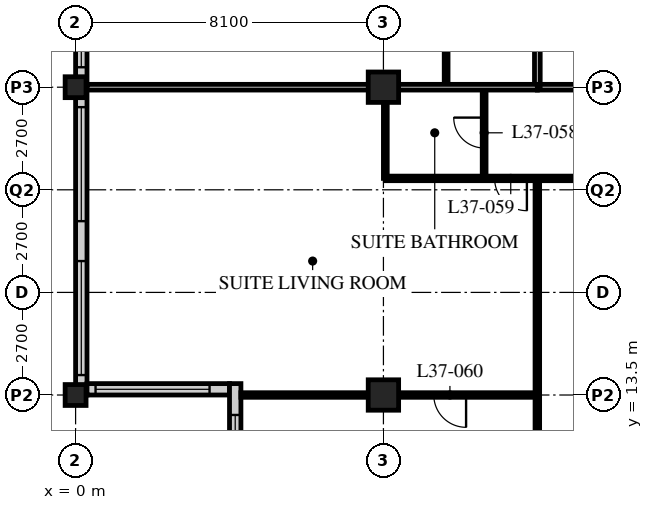
"""IFC4 building model, lengths in metres.
Left out: names, types, materials, properties, quantities, classifications, styles, units other than length and angle.
Written with IfcOpenShell. Run it as: python <this file> out.ifc"""

import sys

from ifc_helpers import new_model, si_unit, direction, frame, frame_2d, origin, origin_2d, place, context, subcontext, project, spatial, rectangle, hollow_rectangle, extrude, element, fill, save


model = new_model("IFC4")
c1 = context("Model", 3, precision=1e-05, world=origin(), true_north=direction((0.0, 1.0)))
c2 = subcontext(c1, "Body", "Model", "MODEL_VIEW")
j1 = project(units=[si_unit("LENGTHUNIT", "METRE"), si_unit("PLANEANGLEUNIT", "RADIAN")], contexts=[c1])
p1 = place(None, origin())
s1 = spatial("IfcSite", under=j1, at=p1, CompositionType="ELEMENT")
p2 = place(p1, origin())
s2 = spatial("IfcBuilding", under=s1, at=p2, CompositionType="ELEMENT")
p3 = place(p2, frame((0.0, 0.0, 144.2)))
s3 = spatial("IfcBuildingStorey", under=s2, at=p3, CompositionType="ELEMENT", Elevation=144.2)
for number, where, z_axis, x_axis in (
    (1, (0.0, 13.5, 0.0), (0.0, 0.0, 1.0), (1.0, 0.0, 0.0)),
    (2, (0.0, 21.6, 0.0), (0.0, 0.0, 1.0), (1.0, 0.0, 0.0)),
):
    element("IfcColumn", number, at=place(p3, frame(where, z_axis=z_axis, x_axis=x_axis)), inside=s3, PredefinedType="COLUMN", context=c2, shape_type="SweptSolid", body=[
        extrude(hollow_rectangle(XDim=0.55, YDim=0.55, WallThickness=0.04, at=origin_2d()), origin(), (0.0, 0.0, 1.0), 3.4),
    ])
for number, where, z_axis, x_axis in (
    (3, (8.1, 13.5, 0.0), (0.0, 0.0, 1.0), (1.0, 0.0, 0.0)),
    (4, (8.1, 21.6, 0.0), (0.0, 0.0, 1.0), (1.0, 0.0, 0.0)),
):
    element("IfcColumn", number, at=place(p3, frame(where, z_axis=z_axis, x_axis=x_axis)), inside=s3, PredefinedType="COLUMN", context=c2, shape_type="SweptSolid", body=[
        extrude(hollow_rectangle(XDim=0.8, YDim=0.8, WallThickness=0.08, at=origin_2d()), origin(), (0.0, 0.0, 1.0), 3.4),
    ])
p4 = place(p3, frame((0.15, 45.6, 0.0), z_axis=(0.0, 0.0, 1.0), x_axis=(0.0, -1.0, 0.0)))
e5 = element("IfcWall", 5, at=p4, inside=s3, PredefinedType="SOLIDWALL", context=c2, shape_type="SweptSolid", body=[
    extrude(rectangle(XDim=32.1, YDim=0.3, at=frame_2d((16.05, 0.0))), origin(), (0.0, 0.0, 1.0), 3.19),
])
p5 = place(p4, frame((0.225, 0.0, 0.9)))
e6 = element("IfcOpeningElement", 6, at=p5, cuts=e5, PredefinedType="OPENING", context=c2, shape_type="SweptSolid", body=[
    extrude(rectangle(XDim=3.0, YDim=1.4, at=frame_2d((1.5, 0.7))), frame((0.0, 0.16, 0.0), z_axis=(0.0, -1.0, 0.0), x_axis=(1.0, 0.0, 0.0)), (0.0, 0.0, 1.0), 0.32),
])
p6 = place(p4, frame((4.275, 0.0, 0.9)))
e7 = element("IfcOpeningElement", 7, at=p6, cuts=e5, PredefinedType="OPENING", context=c2, shape_type="SweptSolid", body=[
    extrude(rectangle(XDim=3.0, YDim=1.4, at=frame_2d((1.5, 0.7))), frame((0.0, 0.16, 0.0), z_axis=(0.0, -1.0, 0.0), x_axis=(1.0, 0.0, 0.0)), (0.0, 0.0, 1.0), 0.32),
])
p7 = place(p4, frame((8.325, 0.0, 0.9)))
e8 = element("IfcOpeningElement", 8, at=p7, cuts=e5, PredefinedType="OPENING", context=c2, shape_type="SweptSolid", body=[
    extrude(rectangle(XDim=3.0, YDim=1.4, at=frame_2d((1.5, 0.7))), frame((0.0, 0.16, 0.0), z_axis=(0.0, -1.0, 0.0), x_axis=(1.0, 0.0, 0.0)), (0.0, 0.0, 1.0), 0.32),
])
p8 = place(p4, frame((12.375, 0.0, 0.9)))
e9 = element("IfcOpeningElement", 9, at=p8, cuts=e5, PredefinedType="OPENING", context=c2, shape_type="SweptSolid", body=[
    extrude(rectangle(XDim=3.0, YDim=1.4, at=frame_2d((1.5, 0.7))), frame((0.0, 0.16, 0.0), z_axis=(0.0, -1.0, 0.0), x_axis=(1.0, 0.0, 0.0)), (0.0, 0.0, 1.0), 0.32),
])
p9 = place(p4, frame((16.425, 0.0, 0.9)))
e10 = element("IfcOpeningElement", 10, at=p9, cuts=e5, PredefinedType="OPENING", context=c2, shape_type="SweptSolid", body=[
    extrude(rectangle(XDim=3.0, YDim=1.4, at=frame_2d((1.5, 0.7))), frame((0.0, 0.16, 0.0), z_axis=(0.0, -1.0, 0.0), x_axis=(1.0, 0.0, 0.0)), (0.0, 0.0, 1.0), 0.32),
])
p10 = place(p4, frame((20.475, 0.0, 0.9)))
e11 = element("IfcOpeningElement", 11, at=p10, cuts=e5, PredefinedType="OPENING", context=c2, shape_type="SweptSolid", body=[
    extrude(rectangle(XDim=3.0, YDim=1.4, at=frame_2d((1.5, 0.7))), frame((0.0, 0.16, 0.0), z_axis=(0.0, -1.0, 0.0), x_axis=(1.0, 0.0, 0.0)), (0.0, 0.0, 1.0), 0.32),
])
p11 = place(p4, frame((24.525, 0.0, 0.9)))
e12 = element("IfcOpeningElement", 12, at=p11, cuts=e5, PredefinedType="OPENING", context=c2, shape_type="SweptSolid", body=[
    extrude(rectangle(XDim=3.0, YDim=1.4, at=frame_2d((1.5, 0.7))), frame((0.0, 0.16, 0.0), z_axis=(0.0, -1.0, 0.0), x_axis=(1.0, 0.0, 0.0)), (0.0, 0.0, 1.0), 0.32),
])
p12 = place(p4, frame((28.575, 0.0, 0.9)))
e13 = element("IfcOpeningElement", 13, at=p12, cuts=e5, PredefinedType="OPENING", context=c2, shape_type="SweptSolid", body=[
    extrude(rectangle(XDim=3.0, YDim=1.4, at=frame_2d((1.5, 0.7))), frame((0.0, 0.16, 0.0), z_axis=(0.0, -1.0, 0.0), x_axis=(1.0, 0.0, 0.0)), (0.0, 0.0, 1.0), 0.32),
])
p13 = place(p3, frame((0.3, 13.65, 0.0), z_axis=(0.0, 0.0, 1.0), x_axis=(1.0, 0.0, 0.0)))
e14 = element("IfcWall", 14, at=p13, inside=s3, PredefinedType="SOLIDWALL", context=c2, shape_type="SweptSolid", body=[
    extrude(rectangle(XDim=3.75, YDim=0.3, at=frame_2d((1.875, 0.0))), origin(), (0.0, 0.0, 1.0), 3.19),
])
p14 = place(p13, frame((0.225, 0.0, 0.9)))
e15 = element("IfcOpeningElement", 15, at=p14, cuts=e14, PredefinedType="OPENING", context=c2, shape_type="SweptSolid", body=[
    extrude(rectangle(XDim=3.0, YDim=1.4, at=frame_2d((1.5, 0.7))), frame((0.0, 0.16, 0.0), z_axis=(0.0, -1.0, 0.0), x_axis=(1.0, 0.0, 0.0)), (0.0, 0.0, 1.0), 0.32),
])
p15 = place(p3, frame((4.2, 13.8, 0.0), z_axis=(0.0, 0.0, 1.0), x_axis=(0.0, -1.0, 0.0)))
e16 = element("IfcWall", 16, at=p15, inside=s3, PredefinedType="SOLIDWALL", context=c2, shape_type="SweptSolid", body=[
    extrude(rectangle(XDim=4.35, YDim=0.3, at=frame_2d((2.175, 0.0))), origin(), (0.0, 0.0, 1.0), 3.19),
])
p16 = place(p15, frame((0.825, 0.0, 0.9)))
e17 = element("IfcOpeningElement", 17, at=p16, cuts=e16, PredefinedType="OPENING", context=c2, shape_type="SweptSolid", body=[
    extrude(rectangle(XDim=3.0, YDim=1.4, at=frame_2d((1.5, 0.7))), frame((0.0, 0.16, 0.0), z_axis=(0.0, -1.0, 0.0), x_axis=(1.0, 0.0, 0.0)), (0.0, 0.0, 1.0), 0.32),
])
p17 = place(p3, frame((12.15, 21.6, 0.0), z_axis=(0.0, 0.0, 1.0), x_axis=(1.0, 0.0, 0.0)))
e18 = element("IfcWall", 18, at=p17, inside=s3, PredefinedType="PARTITIONING", context=c2, shape_type="SweptSolid", body=[
    extrude(rectangle(XDim=36.45, YDim=0.15, at=frame_2d((18.225, 0.0))), origin(), (0.0, 0.0, 1.0), 2.42),
])
p18 = place(p17, frame((5.95, 0.0, 0.0)))
e19 = element("IfcOpeningElement", 19, at=p18, cuts=e18, PredefinedType="OPENING", context=c2, shape_type="SweptSolid", body=[
    extrude(rectangle(XDim=1.0, YDim=2.1, at=frame_2d((0.5, 1.05))), frame((0.0, 0.085, 0.0), z_axis=(0.0, -1.0, 0.0), x_axis=(1.0, 0.0, 0.0)), (0.0, 0.0, 1.0), 0.17),
])
p19 = place(p17, frame((14.05, 0.0, 0.0)))
e20 = element("IfcOpeningElement", 20, at=p19, cuts=e18, PredefinedType="OPENING", context=c2, shape_type="SweptSolid", body=[
    extrude(rectangle(XDim=1.0, YDim=2.1, at=frame_2d((0.5, 1.05))), frame((0.0, 0.085, 0.0), z_axis=(0.0, -1.0, 0.0), x_axis=(1.0, 0.0, 0.0)), (0.0, 0.0, 1.0), 0.17),
])
p20 = place(p17, frame((22.15, 0.0, 0.0)))
e21 = element("IfcOpeningElement", 21, at=p20, cuts=e18, PredefinedType="OPENING", context=c2, shape_type="SweptSolid", body=[
    extrude(rectangle(XDim=1.0, YDim=2.1, at=frame_2d((0.5, 1.05))), frame((0.0, 0.085, 0.0), z_axis=(0.0, -1.0, 0.0), x_axis=(1.0, 0.0, 0.0)), (0.0, 0.0, 1.0), 0.17),
])
p21 = place(p17, frame((30.8, 0.0, 0.0)))
e22 = element("IfcOpeningElement", 22, at=p21, cuts=e18, PredefinedType="OPENING", context=c2, shape_type="SweptSolid", body=[
    extrude(rectangle(XDim=1.0, YDim=2.1, at=frame_2d((0.5, 1.05))), frame((0.0, 0.085, 0.0), z_axis=(0.0, -1.0, 0.0), x_axis=(1.0, 0.0, 0.0)), (0.0, 0.0, 1.0), 0.17),
])
p22 = place(p17, frame((1.525, 0.0, 0.0)))
e23 = element("IfcOpeningElement", 23, at=p22, cuts=e18, PredefinedType="OPENING", context=c2, shape_type="SweptSolid", body=[
    extrude(rectangle(XDim=1.0, YDim=2.1, at=frame_2d((0.5, 1.05))), frame((0.0, 0.085, 0.0), z_axis=(0.0, -1.0, 0.0), x_axis=(1.0, 0.0, 0.0)), (0.0, 0.0, 1.0), 0.17),
])
p23 = place(p17, frame((33.925, 0.0, 0.0)))
e24 = element("IfcOpeningElement", 24, at=p23, cuts=e18, PredefinedType="OPENING", context=c2, shape_type="SweptSolid", body=[
    extrude(rectangle(XDim=1.0, YDim=2.1, at=frame_2d((0.5, 1.05))), frame((0.0, 0.085, 0.0), z_axis=(0.0, -1.0, 0.0), x_axis=(1.0, 0.0, 0.0)), (0.0, 0.0, 1.0), 0.17),
])
p24 = place(p3, frame((12.15, 21.6, 0.0), z_axis=(0.0, 0.0, 1.0), x_axis=(0.0, 1.0, 0.0)))
e25 = element("IfcWall", 25, at=p24, inside=s3, PredefinedType="PARTITIONING", context=c2, shape_type="SweptSolid", body=[
    extrude(rectangle(XDim=24.3, YDim=0.15, at=frame_2d((12.15, 0.0))), origin(), (0.0, 0.0, 1.0), 3.19),
])
p25 = place(p24, frame((5.575, 0.0, 0.0)))
e26 = element("IfcOpeningElement", 26, at=p25, cuts=e25, PredefinedType="OPENING", context=c2, shape_type="SweptSolid", body=[
    extrude(rectangle(XDim=1.0, YDim=2.1, at=frame_2d((0.5, 1.05))), frame((0.0, 0.085, 0.0), z_axis=(0.0, -1.0, 0.0), x_axis=(1.0, 0.0, 0.0)), (0.0, 0.0, 1.0), 0.17),
])
p26 = place(p24, frame((14.05, 0.0, 0.0)))
e27 = element("IfcOpeningElement", 27, at=p26, cuts=e25, PredefinedType="OPENING", context=c2, shape_type="SweptSolid", body=[
    extrude(rectangle(XDim=1.0, YDim=2.1, at=frame_2d((0.5, 1.05))), frame((0.0, 0.085, 0.0), z_axis=(0.0, -1.0, 0.0), x_axis=(1.0, 0.0, 0.0)), (0.0, 0.0, 1.0), 0.17),
])
p27 = place(p24, frame((22.7, 0.0, 0.0)))
e28 = element("IfcOpeningElement", 28, at=p27, cuts=e25, PredefinedType="OPENING", context=c2, shape_type="SweptSolid", body=[
    extrude(rectangle(XDim=1.0, YDim=2.1, at=frame_2d((0.5, 1.05))), frame((0.0, 0.085, 0.0), z_axis=(0.0, -1.0, 0.0), x_axis=(1.0, 0.0, 0.0)), (0.0, 0.0, 1.0), 0.17),
])
p28 = place(p3, frame((9.75, 21.6, 0.0), z_axis=(0.0, 0.0, 1.0), x_axis=(0.0, 1.0, 0.0)))
e29 = element("IfcWall", 29, at=p28, inside=s3, PredefinedType="PARTITIONING", context=c2, shape_type="SweptSolid", body=[
    extrude(rectangle(XDim=2.6, YDim=0.1, at=frame_2d((1.3, 0.0))), origin(), (0.0, 0.0, 1.0), 3.19),
])
p29 = place(p3, frame((10.75, 21.6, 0.0), z_axis=(0.0, 0.0, 1.0), x_axis=(0.0, -1.0, 0.0)))
e30 = element("IfcWall", 30, at=p29, inside=s3, PredefinedType="PARTITIONING", context=c2, shape_type="SweptSolid", body=[
    extrude(rectangle(XDim=2.4, YDim=0.1, at=frame_2d((1.2, 0.0))), origin(), (0.0, 0.0, 1.0), 3.19),
])
p30 = place(p29, frame((0.8, 0.0, 0.0)))
e31 = element("IfcOpeningElement", 31, at=p30, cuts=e30, PredefinedType="OPENING", context=c2, shape_type="SweptSolid", body=[
    extrude(rectangle(XDim=0.8, YDim=2.1, at=frame_2d((0.4, 1.05))), frame((0.0, 0.06, 0.0), z_axis=(0.0, -1.0, 0.0), x_axis=(1.0, 0.0, 0.0)), (0.0, 0.0, 1.0), 0.12),
])
p31 = place(p3, frame((8.15, 21.6, 0.0), z_axis=(0.0, 0.0, 1.0), x_axis=(0.0, -1.0, 0.0)))
e32 = element("IfcWall", 32, at=p31, inside=s3, PredefinedType="PARTITIONING", context=c2, shape_type="SweptSolid", body=[
    extrude(rectangle(XDim=2.4, YDim=0.1, at=frame_2d((1.2, 0.0))), origin(), (0.0, 0.0, 1.0), 2.42),
])
p32 = place(p3, frame((8.15, 19.2, 0.0), z_axis=(0.0, 0.0, 1.0), x_axis=(1.0, 0.0, 0.0)))
e33 = element("IfcWall", 33, at=p32, inside=s3, PredefinedType="PARTITIONING", context=c2, shape_type="SweptSolid", body=[
    extrude(rectangle(XDim=8.05, YDim=0.12, at=frame_2d((4.025, 0.0))), origin(), (0.0, 0.0, 1.0), 3.19),
])
p33 = place(p32, frame((6.725, 0.0, 0.0)))
e34 = element("IfcOpeningElement", 34, at=p33, cuts=e33, PredefinedType="OPENING", context=c2, shape_type="SweptSolid", body=[
    extrude(rectangle(XDim=0.85, YDim=2.1, at=frame_2d((0.425, 1.05))), frame((0.0, 0.07, 0.0), z_axis=(0.0, -1.0, 0.0), x_axis=(1.0, 0.0, 0.0)), (0.0, 0.0, 1.0), 0.14),
])
p34 = place(p32, frame((2.875, 0.0, 0.0)))
e35 = element("IfcOpeningElement", 35, at=p34, cuts=e33, PredefinedType="OPENING", context=c2, shape_type="SweptSolid", body=[
    extrude(rectangle(XDim=0.85, YDim=2.1, at=frame_2d((0.425, 1.05))), frame((0.0, 0.07, 0.0), z_axis=(0.0, -1.0, 0.0), x_axis=(1.0, 0.0, 0.0)), (0.0, 0.0, 1.0), 0.14),
])
p35 = place(p3, frame((12.15, 19.2, 0.0), z_axis=(0.0, 0.0, 1.0), x_axis=(0.0, -1.0, 0.0)))
e36 = element("IfcWall", 36, at=p35, inside=s3, PredefinedType="PARTITIONING", context=c2, shape_type="SweptSolid", body=[
    extrude(rectangle(XDim=13.5, YDim=0.12, at=frame_2d((6.75, 0.0))), origin(), (0.0, 0.0, 1.0), 3.19),
])
p36 = place(p3, frame((12.15, 13.5, 0.0), z_axis=(0.0, 0.0, 1.0), x_axis=(-1.0, 0.0, 0.0)))
e37 = element("IfcWall", 37, at=p36, inside=s3, PredefinedType="PARTITIONING", context=c2, shape_type="SweptSolid", body=[
    extrude(rectangle(XDim=7.8, YDim=0.12, at=frame_2d((3.9, 0.0))), origin(), (0.0, 0.0, 1.0), 2.42),
])
p37 = place(p36, frame((1.875, 0.0, 0.0)))
e38 = element("IfcOpeningElement", 38, at=p37, cuts=e37, PredefinedType="OPENING", context=c2, shape_type="SweptSolid", body=[
    extrude(rectangle(XDim=0.85, YDim=2.1, at=frame_2d((0.425, 1.05))), frame((0.0, 0.07, 0.0), z_axis=(0.0, -1.0, 0.0), x_axis=(1.0, 0.0, 0.0)), (0.0, 0.0, 1.0), 0.14),
])
p38 = place(p3, frame((0.3, 21.6, 0.0), z_axis=(0.0, 0.0, 1.0), x_axis=(1.0, 0.0, 0.0)))
e39 = element("IfcWall", 39, at=p38, inside=s3, PredefinedType="PARTITIONING", context=c2, shape_type="SweptSolid", body=[
    extrude(rectangle(XDim=11.85, YDim=0.15, at=frame_2d((5.925, 0.0))), origin(), (0.0, 0.0, 1.0), 2.42),
])
p39 = place(p10, origin())
e40 = element("IfcWindow", 40, at=p39, inside=s3, PartitioningType="SINGLE_PANEL", PredefinedType="WINDOW", context=c2, shape_type="SweptSolid", body=[
    extrude(rectangle(XDim=3.0, YDim=1.4, at=frame_2d((1.5, 0.7))), frame((0.0, 0.03, 0.0), z_axis=(0.0, -1.0, 0.0), x_axis=(1.0, 0.0, 0.0)), (0.0, 0.0, 1.0), 0.06),
])
fill(e11, e40)
p40 = place(p11, origin())
e41 = element("IfcWindow", 41, at=p40, inside=s3, PartitioningType="SINGLE_PANEL", PredefinedType="WINDOW", context=c2, shape_type="SweptSolid", body=[
    extrude(rectangle(XDim=3.0, YDim=1.4, at=frame_2d((1.5, 0.7))), frame((0.0, 0.03, 0.0), z_axis=(0.0, -1.0, 0.0), x_axis=(1.0, 0.0, 0.0)), (0.0, 0.0, 1.0), 0.06),
])
fill(e12, e41)
p41 = place(p12, origin())
e42 = element("IfcWindow", 42, at=p41, inside=s3, PartitioningType="SINGLE_PANEL", PredefinedType="WINDOW", context=c2, shape_type="SweptSolid", body=[
    extrude(rectangle(XDim=3.0, YDim=1.4, at=frame_2d((1.5, 0.7))), frame((0.0, 0.03, 0.0), z_axis=(0.0, -1.0, 0.0), x_axis=(1.0, 0.0, 0.0)), (0.0, 0.0, 1.0), 0.06),
])
fill(e13, e42)
p42 = place(p14, origin())
e43 = element("IfcWindow", 43, at=p42, inside=s3, PartitioningType="SINGLE_PANEL", PredefinedType="WINDOW", context=c2, shape_type="SweptSolid", body=[
    extrude(rectangle(XDim=3.0, YDim=1.4, at=frame_2d((1.5, 0.7))), frame((0.0, 0.03, 0.0), z_axis=(0.0, -1.0, 0.0), x_axis=(1.0, 0.0, 0.0)), (0.0, 0.0, 1.0), 0.06),
])
fill(e15, e43)
p43 = place(p16, origin())
e44 = element("IfcWindow", 44, at=p43, inside=s3, PartitioningType="SINGLE_PANEL", PredefinedType="WINDOW", context=c2, shape_type="SweptSolid", body=[
    extrude(rectangle(XDim=3.0, YDim=1.4, at=frame_2d((1.5, 0.7))), frame((0.0, 0.03, 0.0), z_axis=(0.0, -1.0, 0.0), x_axis=(1.0, 0.0, 0.0)), (0.0, 0.0, 1.0), 0.06),
])
fill(e17, e44)
p44 = place(p30, origin())
e45 = element("IfcDoor", 45, at=p44, inside=s3, OperationType="SINGLE_SWING_RIGHT", PredefinedType="DOOR", context=c2, shape_type="SweptSolid", body=[
    extrude(rectangle(XDim=0.8, YDim=2.1, at=frame_2d((0.4, 1.05))), frame((0.0, 0.025, 0.0), z_axis=(0.0, -1.0, 0.0), x_axis=(1.0, 0.0, 0.0)), (0.0, 0.0, 1.0), 0.05),
])
fill(e31, e45)
p45 = place(p34, origin())
e46 = element("IfcDoor", 46, at=p45, inside=s3, OperationType="SINGLE_SWING_LEFT", PredefinedType="DOOR", context=c2, shape_type="SweptSolid", body=[
    extrude(rectangle(XDim=0.85, YDim=2.1, at=frame_2d((0.425, 1.05))), frame((0.0, 0.025, 0.0), z_axis=(0.0, -1.0, 0.0), x_axis=(1.0, 0.0, 0.0)), (0.0, 0.0, 1.0), 0.05),
])
fill(e35, e46)
p46 = place(p37, origin())
e47 = element("IfcDoor", 47, at=p46, inside=s3, OperationType="SINGLE_SWING_LEFT", PredefinedType="DOOR", context=c2, shape_type="SweptSolid", body=[
    extrude(rectangle(XDim=0.85, YDim=2.1, at=frame_2d((0.425, 1.05))), frame((0.0, 0.025, 0.0), z_axis=(0.0, -1.0, 0.0), x_axis=(1.0, 0.0, 0.0)), (0.0, 0.0, 1.0), 0.05),
])
fill(e38, e47)
save(model, sys.argv[1])
